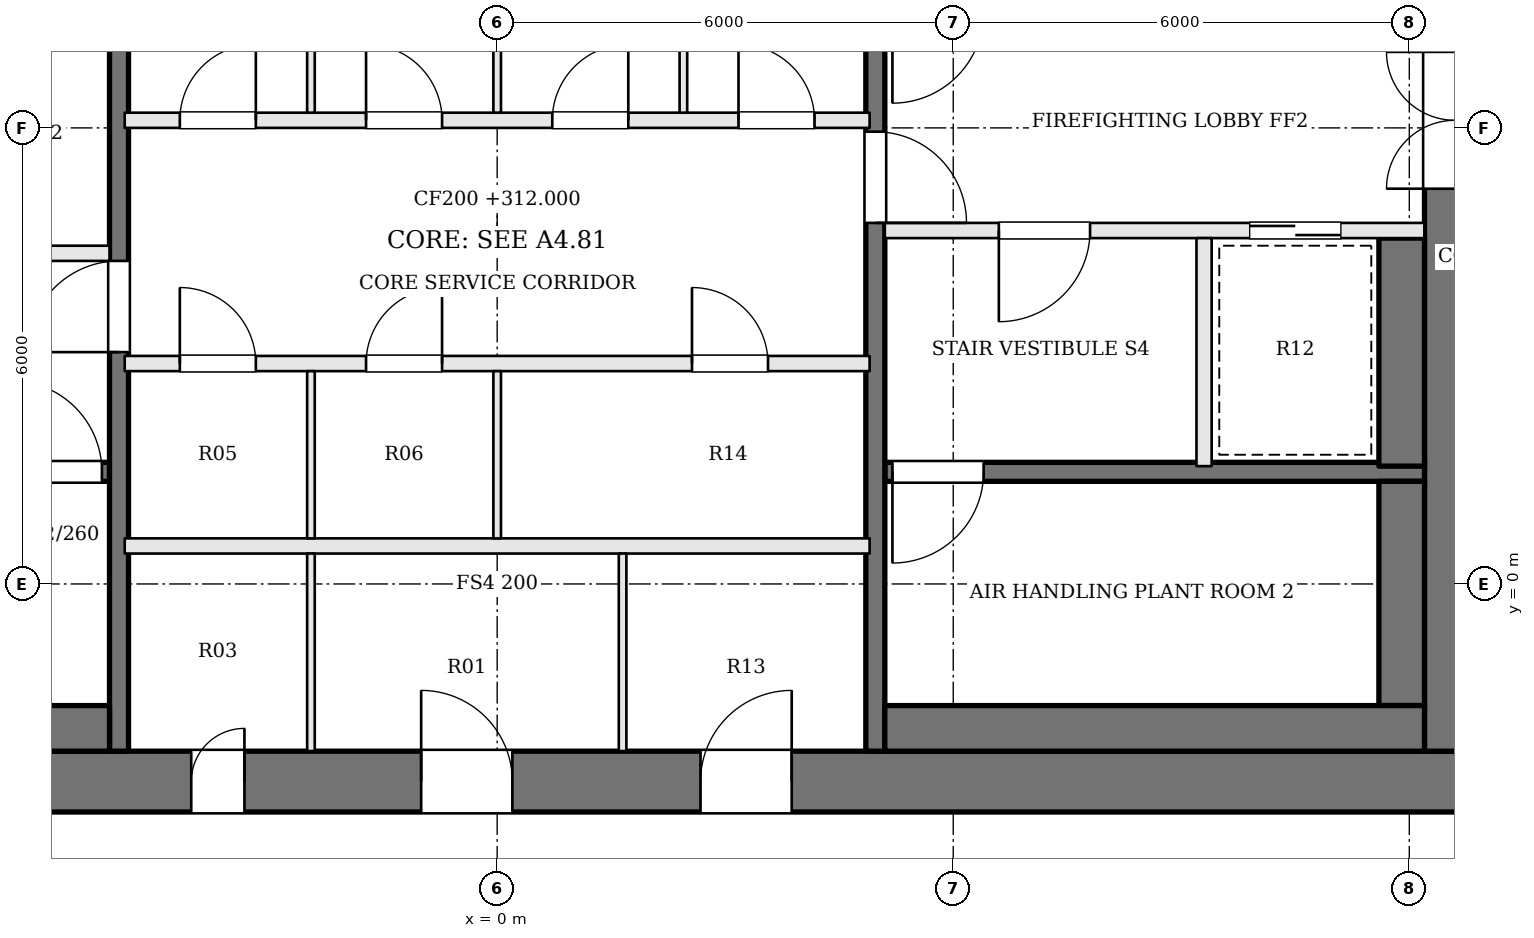
"""IFC4 building model, lengths in metres.
Left out: names, types, materials, properties, quantities, classifications, styles, units other than length and angle.
Written with IfcOpenShell. Run it as: python <this file> out.ifc"""

import sys

from ifc_helpers import new_model, si_unit, direction, frame, frame_2d, origin, place, context, subcontext, project, spatial, rectangle, extrude, element, fill, save


model = new_model("IFC4")
c1 = context("Model", 3, precision=1e-05, world=origin(), true_north=direction((0.0, 1.0)))
c2 = subcontext(c1, "Body", "Model", "MODEL_VIEW")
j1 = project(units=[si_unit("LENGTHUNIT", "METRE"), si_unit("PLANEANGLEUNIT", "RADIAN")], contexts=[c1])
p1 = place(None, origin())
s1 = spatial("IfcSite", under=j1, at=p1, CompositionType="ELEMENT")
p2 = place(p1, origin())
s2 = spatial("IfcBuilding", under=s1, at=p2, CompositionType="ELEMENT")
p3 = place(p2, frame((0.0, 0.0, 312.0)))
s3 = spatial("IfcBuildingStorey", under=s2, at=p3, CompositionType="ELEMENT", Elevation=312.0)
p4 = place(p3, frame((-13.0, -2.6, 0.0), z_axis=(0.0, 0.0, 1.0), x_axis=(1.0, 0.0, 0.0)))
e1 = element("IfcWall", 1, at=p4, inside=s3, PredefinedType="SHEAR", context=c2, shape_type="SweptSolid", body=[
    extrude(rectangle(XDim=26.0, YDim=0.8, at=frame_2d((13.0, 0.0))), origin(), (0.0, 0.0, 1.0), 4.2),
])
p5 = place(p4, frame((8.975, 0.0, 0.0)))
e2 = element("IfcOpeningElement", 2, at=p5, cuts=e1, PredefinedType="OPENING", context=c2, shape_type="SweptSolid", body=[
    extrude(rectangle(XDim=0.7, YDim=2.1, at=frame_2d((0.35, 1.05))), frame((0.0, 0.41, 0.0), z_axis=(0.0, -1.0, 0.0), x_axis=(1.0, 0.0, 0.0)), (0.0, 0.0, 1.0), 0.82),
])
p6 = place(p4, frame((12.0, 0.0, 0.0)))
e3 = element("IfcOpeningElement", 3, at=p6, cuts=e1, PredefinedType="OPENING", context=c2, shape_type="SweptSolid", body=[
    extrude(rectangle(XDim=1.2, YDim=2.1, at=frame_2d((0.6, 1.05))), frame((0.0, 0.41, 0.0), z_axis=(0.0, -1.0, 0.0), x_axis=(1.0, 0.0, 0.0)), (0.0, 0.0, 1.0), 0.82),
])
p7 = place(p4, frame((15.675, 0.0, 0.0)))
e4 = element("IfcOpeningElement", 4, at=p7, cuts=e1, PredefinedType="OPENING", context=c2, shape_type="SweptSolid", body=[
    extrude(rectangle(XDim=1.2, YDim=2.1, at=frame_2d((0.6, 1.05))), frame((0.0, 0.41, 0.0), z_axis=(0.0, -1.0, 0.0), x_axis=(1.0, 0.0, 0.0)), (0.0, 0.0, 1.0), 0.82),
])
p8 = place(p3, frame((12.6, -2.2, 0.0), z_axis=(0.0, 0.0, 1.0), x_axis=(0.0, 1.0, 0.0)))
e5 = element("IfcWall", 5, at=p8, inside=s3, PredefinedType="SHEAR", context=c2, shape_type="SweptSolid", body=[
    extrude(rectangle(XDim=13.4, YDim=0.8, at=frame_2d((6.7, 0.0))), origin(), (0.0, 0.0, 1.0), 4.2),
])
p9 = place(p8, frame((7.4, 0.0, 0.0)))
e6 = element("IfcOpeningElement", 6, at=p9, cuts=e5, PredefinedType="OPENING", context=c2, shape_type="SweptSolid", body=[
    extrude(rectangle(XDim=1.8, YDim=2.1, at=frame_2d((0.9, 1.05))), frame((0.0, 0.41, 0.0), z_axis=(0.0, -1.0, 0.0), x_axis=(1.0, 0.0, 0.0)), (0.0, 0.0, 1.0), 0.82),
])
p10 = place(p3, frame((-12.2, 1.475, 0.0), z_axis=(0.0, 0.0, 1.0), x_axis=(1.0, 0.0, 0.0)))
e7 = element("IfcWall", 7, at=p10, inside=s3, PredefinedType="SOLIDWALL", context=c2, shape_type="SweptSolid", body=[
    extrude(rectangle(XDim=7.1, YDim=0.25, at=frame_2d((3.55, 0.0))), origin(), (0.0, 0.0, 1.0), 4.0),
])
p11 = place(p10, frame((5.8, 0.0, 0.0)))
e8 = element("IfcOpeningElement", 8, at=p11, cuts=e7, PredefinedType="OPENING", context=c2, shape_type="SweptSolid", body=[
    extrude(rectangle(XDim=1.2, YDim=2.1, at=frame_2d((0.6, 1.05))), frame((0.0, 0.135, 0.0), z_axis=(0.0, -1.0, 0.0), x_axis=(1.0, 0.0, 0.0)), (0.0, 0.0, 1.0), 0.27),
])
p12 = place(p3, frame((-12.2, 4.35, 0.0), z_axis=(0.0, 0.0, 1.0), x_axis=(1.0, 0.0, 0.0)))
e9 = element("IfcWall", 9, at=p12, inside=s3, PredefinedType="SOLIDWALL", context=c2, shape_type="SweptSolid", body=[
    extrude(rectangle(XDim=7.1, YDim=0.2, at=frame_2d((3.55, 0.0))), origin(), (0.0, 0.0, 1.0), 4.0),
])
p13 = place(p12, frame((4.4, 0.0, 0.0)))
e10 = element("IfcOpeningElement", 10, at=p13, cuts=e9, PredefinedType="OPENING", context=c2, shape_type="SweptSolid", body=[
    extrude(rectangle(XDim=1.2, YDim=2.1, at=frame_2d((0.6, 1.05))), frame((0.0, 0.11, 0.0), z_axis=(0.0, -1.0, 0.0), x_axis=(1.0, 0.0, 0.0)), (0.0, 0.0, 1.0), 0.22),
])
p14 = place(p12, frame((1.1, 0.0, 0.0)))
e11 = element("IfcOpeningElement", 11, at=p14, cuts=e9, PredefinedType="OPENING", context=c2, shape_type="SweptSolid", body=[
    extrude(rectangle(XDim=1.2, YDim=2.1, at=frame_2d((0.6, 1.05))), frame((0.0, 0.11, 0.0), z_axis=(0.0, -1.0, 0.0), x_axis=(1.0, 0.0, 0.0)), (0.0, 0.0, 1.0), 0.22),
])
p15 = place(p3, frame((12.2, 4.65, 0.0), z_axis=(0.0, 0.0, 1.0), x_axis=(-1.0, 0.0, 0.0)))
e12 = element("IfcWall", 12, at=p15, inside=s3, PredefinedType="SOLIDWALL", context=c2, shape_type="SweptSolid", body=[
    extrude(rectangle(XDim=7.1, YDim=0.2, at=frame_2d((3.55, 0.0))), origin(), (0.0, 0.0, 1.0), 4.0),
])
p16 = place(p15, frame((4.4, 0.0, 0.0)))
e13 = element("IfcOpeningElement", 13, at=p16, cuts=e12, PredefinedType="OPENING", context=c2, shape_type="SweptSolid", body=[
    extrude(rectangle(XDim=1.2, YDim=2.1, at=frame_2d((0.6, 1.05))), frame((0.0, 0.11, 0.0), z_axis=(0.0, -1.0, 0.0), x_axis=(1.0, 0.0, 0.0)), (0.0, 0.0, 1.0), 0.22),
])
p17 = place(p15, frame((1.1, 0.0, 0.0)))
e14 = element("IfcOpeningElement", 14, at=p17, cuts=e12, PredefinedType="OPENING", context=c2, shape_type="SweptSolid", body=[
    extrude(rectangle(XDim=1.2, YDim=2.1, at=frame_2d((0.6, 1.05))), frame((0.0, 0.11, 0.0), z_axis=(0.0, -1.0, 0.0), x_axis=(1.0, 0.0, 0.0)), (0.0, 0.0, 1.0), 0.22),
])
p18 = place(p3, frame((12.2, 1.475, 0.0), z_axis=(0.0, 0.0, 1.0), x_axis=(-1.0, 0.0, 0.0)))
e15 = element("IfcWall", 15, at=p18, inside=s3, PredefinedType="SOLIDWALL", context=c2, shape_type="SweptSolid", body=[
    extrude(rectangle(XDim=7.1, YDim=0.25, at=frame_2d((3.55, 0.0))), origin(), (0.0, 0.0, 1.0), 4.0),
])
p19 = place(p18, frame((5.8, 0.0, 0.0)))
e16 = element("IfcOpeningElement", 16, at=p19, cuts=e15, PredefinedType="OPENING", context=c2, shape_type="SweptSolid", body=[
    extrude(rectangle(XDim=1.2, YDim=2.1, at=frame_2d((0.6, 1.05))), frame((0.0, 0.135, 0.0), z_axis=(0.0, -1.0, 0.0), x_axis=(1.0, 0.0, 0.0)), (0.0, 0.0, 1.0), 0.27),
])
p20 = place(p3, frame((9.3, 4.55, 0.0), z_axis=(0.0, 0.0, 1.0), x_axis=(0.0, -1.0, 0.0)))
e17 = element("IfcWall", 17, at=p20, inside=s3, PredefinedType="SOLIDWALL", context=c2, shape_type="SweptSolid", body=[
    extrude(rectangle(XDim=3.0, YDim=0.2, at=frame_2d((1.5, 0.0))), origin(), (0.0, 0.0, 1.0), 4.0),
])
p21 = place(p3, frame((-4.975, -2.2, 0.0), z_axis=(0.0, 0.0, 1.0), x_axis=(0.0, 1.0, 0.0)))
e18 = element("IfcWall", 18, at=p21, inside=s3, PredefinedType="SOLIDWALL", context=c2, shape_type="SweptSolid", body=[
    extrude(rectangle(XDim=13.4, YDim=0.25, at=frame_2d((6.7, 0.0))), origin(), (0.0, 0.0, 1.0), 4.0),
])
p22 = place(p21, frame((5.25, 0.0, 0.0)))
e19 = element("IfcOpeningElement", 19, at=p22, cuts=e18, PredefinedType="OPENING", context=c2, shape_type="SweptSolid", body=[
    extrude(rectangle(XDim=1.2, YDim=2.1, at=frame_2d((0.6, 1.05))), frame((0.0, 0.135, 0.0), z_axis=(0.0, -1.0, 0.0), x_axis=(1.0, 0.0, 0.0)), (0.0, 0.0, 1.0), 0.27),
])
p23 = place(p3, frame((4.975, 11.2, 0.0), z_axis=(0.0, 0.0, 1.0), x_axis=(0.0, -1.0, 0.0)))
e20 = element("IfcWall", 20, at=p23, inside=s3, PredefinedType="SOLIDWALL", context=c2, shape_type="SweptSolid", body=[
    extrude(rectangle(XDim=13.4, YDim=0.25, at=frame_2d((6.7, 0.0))), origin(), (0.0, 0.0, 1.0), 4.0),
])
p24 = place(p23, frame((5.25, 0.0, 0.0)))
e21 = element("IfcOpeningElement", 21, at=p24, cuts=e20, PredefinedType="OPENING", context=c2, shape_type="SweptSolid", body=[
    extrude(rectangle(XDim=1.2, YDim=2.1, at=frame_2d((0.6, 1.05))), frame((0.0, 0.135, 0.0), z_axis=(0.0, -1.0, 0.0), x_axis=(1.0, 0.0, 0.0)), (0.0, 0.0, 1.0), 0.27),
])
p25 = place(p3, frame((-12.2, -1.9, 0.0), z_axis=(0.0, 0.0, 1.0), x_axis=(1.0, 0.0, 0.0)))
e22 = element("IfcWall", 22, at=p25, inside=s3, PredefinedType="SOLIDWALL", context=c2, shape_type="SweptSolid", body=[
    extrude(rectangle(XDim=7.1, YDim=0.6, at=frame_2d((3.55, 0.0))), origin(), (0.0, 0.0, 1.0), 4.0),
])
p26 = place(p3, frame((11.9, 4.55, 0.0), z_axis=(0.0, 0.0, 1.0), x_axis=(0.0, -1.0, 0.0)))
e23 = element("IfcWall", 23, at=p26, inside=s3, PredefinedType="SOLIDWALL", context=c2, shape_type="SweptSolid", body=[
    extrude(rectangle(XDim=3.0, YDim=0.6, at=frame_2d((1.5, 0.0))), origin(), (0.0, 0.0, 1.0), 4.0),
])
p27 = place(p3, frame((11.9, 1.35, 0.0), z_axis=(0.0, 0.0, 1.0), x_axis=(0.0, -1.0, 0.0)))
e24 = element("IfcWall", 24, at=p27, inside=s3, PredefinedType="SOLIDWALL", context=c2, shape_type="SweptSolid", body=[
    extrude(rectangle(XDim=2.95, YDim=0.6, at=frame_2d((1.475, 0.0))), origin(), (0.0, 0.0, 1.0), 4.0),
])
p28 = place(p3, frame((12.2, -1.9, 0.0), z_axis=(0.0, 0.0, 1.0), x_axis=(-1.0, 0.0, 0.0)))
e25 = element("IfcWall", 25, at=p28, inside=s3, PredefinedType="SOLIDWALL", context=c2, shape_type="SweptSolid", body=[
    extrude(rectangle(XDim=7.1, YDim=0.6, at=frame_2d((3.55, 0.0))), origin(), (0.0, 0.0, 1.0), 4.0),
])
p29 = place(p3, frame((-4.9, 0.5, 0.0), z_axis=(0.0, 0.0, 1.0), x_axis=(1.0, 0.0, 0.0)))
e26 = element("IfcWall", 26, at=p29, inside=s3, PredefinedType="SOLIDWALL", context=c2, shape_type="SweptSolid", body=[
    extrude(rectangle(XDim=9.8, YDim=0.2, at=frame_2d((4.9, 0.0))), origin(), (0.0, 0.0, 1.0), 4.0),
])
p30 = place(p3, frame((-4.9, 2.9, 0.0), z_axis=(0.0, 0.0, 1.0), x_axis=(1.0, 0.0, 0.0)))
e27 = element("IfcWall", 27, at=p30, inside=s3, PredefinedType="SOLIDWALL", context=c2, shape_type="SweptSolid", body=[
    extrude(rectangle(XDim=9.8, YDim=0.2, at=frame_2d((4.9, 0.0))), origin(), (0.0, 0.0, 1.0), 4.0),
])
p31 = place(p30, frame((0.725, 0.0, 0.0)))
e28 = element("IfcOpeningElement", 28, at=p31, cuts=e27, PredefinedType="OPENING", context=c2, shape_type="SweptSolid", body=[
    extrude(rectangle(XDim=1.0, YDim=2.1, at=frame_2d((0.5, 1.05))), frame((0.0, 0.11, 0.0), z_axis=(0.0, -1.0, 0.0), x_axis=(1.0, 0.0, 0.0)), (0.0, 0.0, 1.0), 0.22),
])
p32 = place(p30, frame((3.175, 0.0, 0.0)))
e29 = element("IfcOpeningElement", 29, at=p32, cuts=e27, PredefinedType="OPENING", context=c2, shape_type="SweptSolid", body=[
    extrude(rectangle(XDim=1.0, YDim=2.1, at=frame_2d((0.5, 1.05))), frame((0.0, 0.11, 0.0), z_axis=(0.0, -1.0, 0.0), x_axis=(1.0, 0.0, 0.0)), (0.0, 0.0, 1.0), 0.22),
])
p33 = place(p30, frame((7.463, 0.0, 0.0)))
e30 = element("IfcOpeningElement", 30, at=p33, cuts=e27, PredefinedType="OPENING", context=c2, shape_type="SweptSolid", body=[
    extrude(rectangle(XDim=1.0, YDim=2.1, at=frame_2d((0.5, 1.05))), frame((0.0, 0.11, 0.0), z_axis=(0.0, -1.0, 0.0), x_axis=(1.0, 0.0, 0.0)), (0.0, 0.0, 1.0), 0.22),
])
p34 = place(p3, frame((-4.9, 6.1, 0.0), z_axis=(0.0, 0.0, 1.0), x_axis=(1.0, 0.0, 0.0)))
e31 = element("IfcWall", 31, at=p34, inside=s3, PredefinedType="SOLIDWALL", context=c2, shape_type="SweptSolid", body=[
    extrude(rectangle(XDim=9.8, YDim=0.2, at=frame_2d((4.9, 0.0))), origin(), (0.0, 0.0, 1.0), 4.0),
])
p35 = place(p34, frame((0.725, 0.0, 0.0)))
e32 = element("IfcOpeningElement", 32, at=p35, cuts=e31, PredefinedType="OPENING", context=c2, shape_type="SweptSolid", body=[
    extrude(rectangle(XDim=1.0, YDim=2.1, at=frame_2d((0.5, 1.05))), frame((0.0, 0.11, 0.0), z_axis=(0.0, -1.0, 0.0), x_axis=(1.0, 0.0, 0.0)), (0.0, 0.0, 1.0), 0.22),
])
p36 = place(p34, frame((3.175, 0.0, 0.0)))
e33 = element("IfcOpeningElement", 33, at=p36, cuts=e31, PredefinedType="OPENING", context=c2, shape_type="SweptSolid", body=[
    extrude(rectangle(XDim=1.0, YDim=2.1, at=frame_2d((0.5, 1.05))), frame((0.0, 0.11, 0.0), z_axis=(0.0, -1.0, 0.0), x_axis=(1.0, 0.0, 0.0)), (0.0, 0.0, 1.0), 0.22),
])
p37 = place(p34, frame((5.625, 0.0, 0.0)))
e34 = element("IfcOpeningElement", 34, at=p37, cuts=e31, PredefinedType="OPENING", context=c2, shape_type="SweptSolid", body=[
    extrude(rectangle(XDim=1.0, YDim=2.1, at=frame_2d((0.5, 1.05))), frame((0.0, 0.11, 0.0), z_axis=(0.0, -1.0, 0.0), x_axis=(1.0, 0.0, 0.0)), (0.0, 0.0, 1.0), 0.22),
])
p38 = place(p34, frame((8.075, 0.0, 0.0)))
e35 = element("IfcOpeningElement", 35, at=p38, cuts=e31, PredefinedType="OPENING", context=c2, shape_type="SweptSolid", body=[
    extrude(rectangle(XDim=1.0, YDim=2.1, at=frame_2d((0.5, 1.05))), frame((0.0, 0.11, 0.0), z_axis=(0.0, -1.0, 0.0), x_axis=(1.0, 0.0, 0.0)), (0.0, 0.0, 1.0), 0.22),
])
for number, where, z_axis, x_axis in (
    (36, (-2.45, 0.6, 0.0), (0.0, 0.0, 1.0), (0.0, 1.0, 0.0)),
    (37, (0.0, 0.6, 0.0), (0.0, 0.0, 1.0), (0.0, 1.0, 0.0)),
    (38, (-2.45, 6.2, 0.0), (0.0, 0.0, 1.0), (0.0, 1.0, 0.0)),
    (39, (0.0, 6.2, 0.0), (0.0, 0.0, 1.0), (0.0, 1.0, 0.0)),
    (40, (2.45, 6.2, 0.0), (0.0, 0.0, 1.0), (0.0, 1.0, 0.0)),
):
    element("IfcWall", number, at=place(p3, frame(where, z_axis=z_axis, x_axis=x_axis)), inside=s3, PredefinedType="PARTITIONING", context=c2, shape_type="SweptSolid", body=[
        extrude(rectangle(XDim=2.2, YDim=0.1, at=frame_2d((1.1, 0.0))), origin(), (0.0, 0.0, 1.0), 4.0),
    ])
for number, where, z_axis, x_axis in (
    (41, (-2.45, -2.2, 0.0), (0.0, 0.0, 1.0), (0.0, 1.0, 0.0)),
    (42, (1.65, -2.2, 0.0), (0.0, 0.0, 1.0), (0.0, 1.0, 0.0)),
):
    element("IfcWall", number, at=place(p3, frame(where, z_axis=z_axis, x_axis=x_axis)), inside=s3, PredefinedType="PARTITIONING", context=c2, shape_type="SweptSolid", body=[
        extrude(rectangle(XDim=2.6, YDim=0.1, at=frame_2d((1.3, 0.0))), origin(), (0.0, 0.0, 1.0), 4.0),
    ])
p39 = place(p9, origin())
e43 = element("IfcDoor", 43, at=p39, inside=s3, OperationType="DOUBLE_DOOR_SINGLE_SWING", PredefinedType="DOOR", context=c2, shape_type="SweptSolid", body=[
    extrude(rectangle(XDim=1.8, YDim=2.1, at=frame_2d((0.9, 1.05))), frame((0.0, 0.025, 0.0), z_axis=(0.0, -1.0, 0.0), x_axis=(1.0, 0.0, 0.0)), (0.0, 0.0, 1.0), 0.05),
])
fill(e6, e43)
p40 = place(p22, origin())
e44 = element("IfcDoor", 44, at=p40, inside=s3, OperationType="SINGLE_SWING_LEFT", PredefinedType="DOOR", context=c2, shape_type="SweptSolid", body=[
    extrude(rectangle(XDim=1.2, YDim=2.1, at=frame_2d((0.6, 1.05))), frame((0.0, 0.025, 0.0), z_axis=(0.0, -1.0, 0.0), x_axis=(1.0, 0.0, 0.0)), (0.0, 0.0, 1.0), 0.05),
])
fill(e19, e44)
p41 = place(p24, origin())
e45 = element("IfcDoor", 45, at=p41, inside=s3, OperationType="SINGLE_SWING_RIGHT", PredefinedType="DOOR", context=c2, shape_type="SweptSolid", body=[
    extrude(rectangle(XDim=1.2, YDim=2.1, at=frame_2d((0.6, 1.05))), frame((0.0, 0.025, 0.0), z_axis=(0.0, -1.0, 0.0), x_axis=(1.0, 0.0, 0.0)), (0.0, 0.0, 1.0), 0.05),
])
fill(e21, e45)
p42 = place(p16, origin())
e46 = element("IfcDoor", 46, at=p42, inside=s3, OperationType="SINGLE_SWING_RIGHT", PredefinedType="DOOR", context=c2, shape_type="SweptSolid", body=[
    extrude(rectangle(XDim=1.2, YDim=2.1, at=frame_2d((0.6, 1.05))), frame((0.0, 0.025, 0.0), z_axis=(0.0, -1.0, 0.0), x_axis=(1.0, 0.0, 0.0)), (0.0, 0.0, 1.0), 0.05),
])
fill(e13, e46)
p43 = place(p11, origin())
e47 = element("IfcDoor", 47, at=p43, inside=s3, OperationType="SINGLE_SWING_LEFT", PredefinedType="DOOR", context=c2, shape_type="SweptSolid", body=[
    extrude(rectangle(XDim=1.2, YDim=2.1, at=frame_2d((0.6, 1.05))), frame((0.0, 0.025, 0.0), z_axis=(0.0, -1.0, 0.0), x_axis=(1.0, 0.0, 0.0)), (0.0, 0.0, 1.0), 0.05),
])
fill(e8, e47)
p44 = place(p19, origin())
e48 = element("IfcDoor", 48, at=p44, inside=s3, OperationType="SINGLE_SWING_RIGHT", PredefinedType="DOOR", context=c2, shape_type="SweptSolid", body=[
    extrude(rectangle(XDim=1.2, YDim=2.1, at=frame_2d((0.6, 1.05))), frame((0.0, 0.025, 0.0), z_axis=(0.0, -1.0, 0.0), x_axis=(1.0, 0.0, 0.0)), (0.0, 0.0, 1.0), 0.05),
])
fill(e16, e48)
p45 = place(p17, origin())
e49 = element("IfcDoor", 49, at=p45, inside=s3, OperationType="SLIDING_TO_RIGHT", PredefinedType="DOOR", context=c2, shape_type="SweptSolid", body=[
    extrude(rectangle(XDim=1.2, YDim=2.1, at=frame_2d((0.6, 1.05))), frame((0.0, 0.025, 0.0), z_axis=(0.0, -1.0, 0.0), x_axis=(1.0, 0.0, 0.0)), (0.0, 0.0, 1.0), 0.05),
])
fill(e14, e49)
p46 = place(p31, origin())
e50 = element("IfcDoor", 50, at=p46, inside=s3, OperationType="SINGLE_SWING_LEFT", PredefinedType="DOOR", context=c2, shape_type="SweptSolid", body=[
    extrude(rectangle(XDim=1.0, YDim=2.1, at=frame_2d((0.5, 1.05))), frame((0.0, 0.025, 0.0), z_axis=(0.0, -1.0, 0.0), x_axis=(1.0, 0.0, 0.0)), (0.0, 0.0, 1.0), 0.05),
])
fill(e28, e50)
p47 = place(p32, origin())
e51 = element("IfcDoor", 51, at=p47, inside=s3, OperationType="SINGLE_SWING_RIGHT", PredefinedType="DOOR", context=c2, shape_type="SweptSolid", body=[
    extrude(rectangle(XDim=1.0, YDim=2.1, at=frame_2d((0.5, 1.05))), frame((0.0, 0.025, 0.0), z_axis=(0.0, -1.0, 0.0), x_axis=(1.0, 0.0, 0.0)), (0.0, 0.0, 1.0), 0.05),
])
fill(e29, e51)
p48 = place(p33, origin())
e52 = element("IfcDoor", 52, at=p48, inside=s3, OperationType="SINGLE_SWING_LEFT", PredefinedType="DOOR", context=c2, shape_type="SweptSolid", body=[
    extrude(rectangle(XDim=1.0, YDim=2.1, at=frame_2d((0.5, 1.05))), frame((0.0, 0.025, 0.0), z_axis=(0.0, -1.0, 0.0), x_axis=(1.0, 0.0, 0.0)), (0.0, 0.0, 1.0), 0.05),
])
fill(e30, e52)
p49 = place(p35, origin())
e53 = element("IfcDoor", 53, at=p49, inside=s3, OperationType="SINGLE_SWING_RIGHT", PredefinedType="DOOR", context=c2, shape_type="SweptSolid", body=[
    extrude(rectangle(XDim=1.0, YDim=2.1, at=frame_2d((0.5, 1.05))), frame((0.0, 0.025, 0.0), z_axis=(0.0, -1.0, 0.0), x_axis=(1.0, 0.0, 0.0)), (0.0, 0.0, 1.0), 0.05),
])
fill(e32, e53)
p50 = place(p36, origin())
e54 = element("IfcDoor", 54, at=p50, inside=s3, OperationType="SINGLE_SWING_LEFT", PredefinedType="DOOR", context=c2, shape_type="SweptSolid", body=[
    extrude(rectangle(XDim=1.0, YDim=2.1, at=frame_2d((0.5, 1.05))), frame((0.0, 0.025, 0.0), z_axis=(0.0, -1.0, 0.0), x_axis=(1.0, 0.0, 0.0)), (0.0, 0.0, 1.0), 0.05),
])
fill(e33, e54)
p51 = place(p37, origin())
e55 = element("IfcDoor", 55, at=p51, inside=s3, OperationType="SINGLE_SWING_RIGHT", PredefinedType="DOOR", context=c2, shape_type="SweptSolid", body=[
    extrude(rectangle(XDim=1.0, YDim=2.1, at=frame_2d((0.5, 1.05))), frame((0.0, 0.025, 0.0), z_axis=(0.0, -1.0, 0.0), x_axis=(1.0, 0.0, 0.0)), (0.0, 0.0, 1.0), 0.05),
])
fill(e34, e55)
p52 = place(p38, origin())
e56 = element("IfcDoor", 56, at=p52, inside=s3, OperationType="SINGLE_SWING_LEFT", PredefinedType="DOOR", context=c2, shape_type="SweptSolid", body=[
    extrude(rectangle(XDim=1.0, YDim=2.1, at=frame_2d((0.5, 1.05))), frame((0.0, 0.025, 0.0), z_axis=(0.0, -1.0, 0.0), x_axis=(1.0, 0.0, 0.0)), (0.0, 0.0, 1.0), 0.05),
])
fill(e35, e56)
p53 = place(p5, origin())
e57 = element("IfcDoor", 57, at=p53, inside=s3, OperationType="SINGLE_SWING_RIGHT", PredefinedType="DOOR", context=c2, shape_type="SweptSolid", body=[
    extrude(rectangle(XDim=0.7, YDim=2.1, at=frame_2d((0.35, 1.05))), frame((0.0, 0.025, 0.0), z_axis=(0.0, -1.0, 0.0), x_axis=(1.0, 0.0, 0.0)), (0.0, 0.0, 1.0), 0.05),
])
fill(e2, e57)
p54 = place(p6, origin())
e58 = element("IfcDoor", 58, at=p54, inside=s3, OperationType="SINGLE_SWING_LEFT", PredefinedType="DOOR", context=c2, shape_type="SweptSolid", body=[
    extrude(rectangle(XDim=1.2, YDim=2.1, at=frame_2d((0.6, 1.05))), frame((0.0, 0.025, 0.0), z_axis=(0.0, -1.0, 0.0), x_axis=(1.0, 0.0, 0.0)), (0.0, 0.0, 1.0), 0.05),
])
fill(e3, e58)
p55 = place(p7, origin())
e59 = element("IfcDoor", 59, at=p55, inside=s3, OperationType="SINGLE_SWING_RIGHT", PredefinedType="DOOR", context=c2, shape_type="SweptSolid", body=[
    extrude(rectangle(XDim=1.2, YDim=2.1, at=frame_2d((0.6, 1.05))), frame((0.0, 0.025, 0.0), z_axis=(0.0, -1.0, 0.0), x_axis=(1.0, 0.0, 0.0)), (0.0, 0.0, 1.0), 0.05),
])
fill(e4, e59)
save(model, sys.argv[1])
